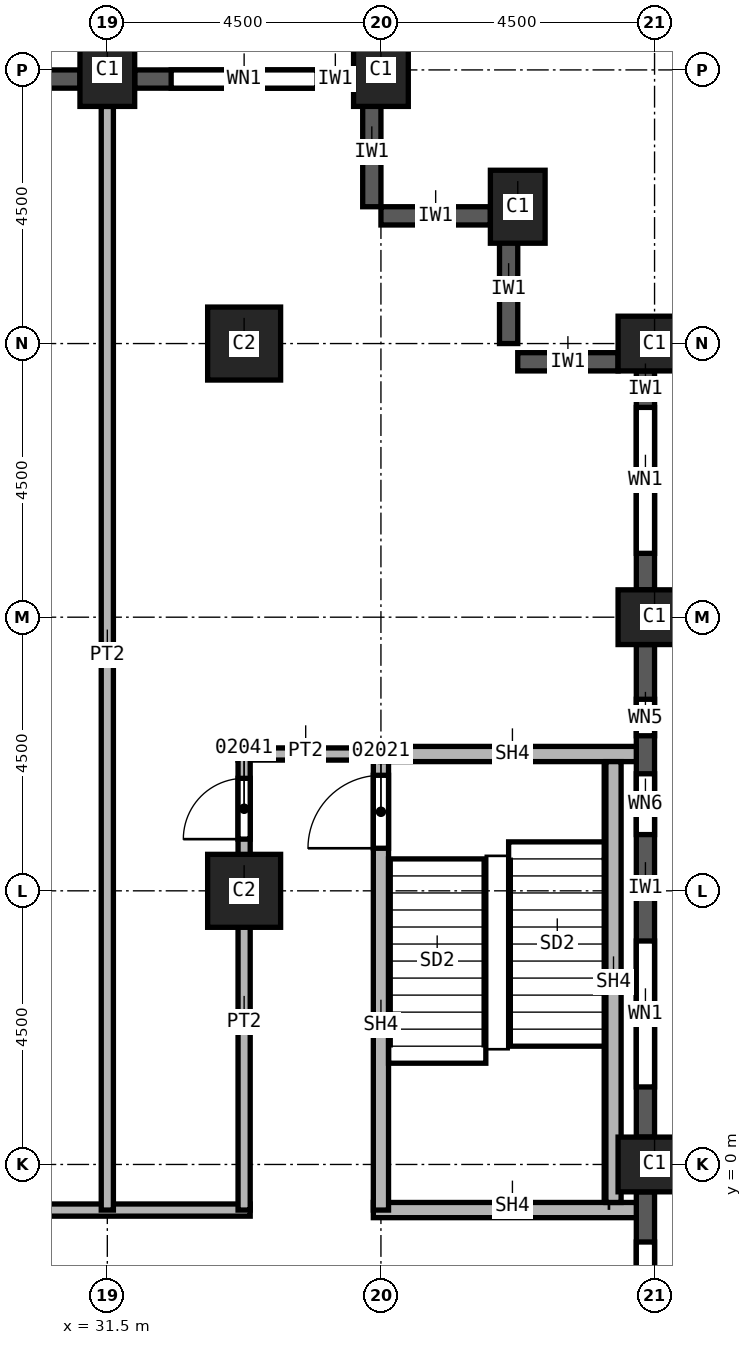
"""IFC4 building model, lengths in metres.
Left out: names, types, materials, properties, quantities, classifications, styles, units other than length and angle.
Written with IfcOpenShell. Run it as: python <this file> out.ifc"""

import sys

from ifc_helpers import new_model, si_unit, direction, frame, frame_2d, origin, origin_2d, place, context, subcontext, project, spatial, rectangle, extrude, element, fill, save


model = new_model("IFC4")
c1 = context("Model", 3, precision=1e-05, world=origin(), true_north=direction((0.0, 1.0)))
c2 = subcontext(c1, "Body", "Model", "MODEL_VIEW")
j1 = project(units=[si_unit("LENGTHUNIT", "METRE"), si_unit("PLANEANGLEUNIT", "RADIAN")], contexts=[c1])
p1 = place(None, origin())
s1 = spatial("IfcSite", under=j1, at=p1, CompositionType="ELEMENT")
p2 = place(p1, origin())
s2 = spatial("IfcBuilding", under=s1, at=p2, CompositionType="ELEMENT")
p3 = place(p2, frame((0.0, 0.0, 80.0)))
s3 = spatial("IfcBuildingStorey", under=s2, at=p3, CompositionType="ELEMENT", Elevation=80.0)
for number, where, z_axis, x_axis in (
    (1, (40.5, 0.0, 0.0), (0.0, 0.0, 1.0), (0.0, 1.0, 0.0)),
    (2, (40.5, 9.0, 0.0), (0.0, 0.0, 1.0), (0.0, 1.0, 0.0)),
    (3, (40.5, 13.5, 0.0), (0.0, 0.0, 1.0), (0.0, 1.0, 0.0)),
    (4, (38.25, 15.75, 0.0), (0.0, 0.0, 1.0), (1.0, 0.0, 0.0)),
    (5, (31.5, 18.0, 0.0), (0.0, 0.0, 1.0), (1.0, 0.0, 0.0)),
    (6, (36.0, 18.0, 0.0), (0.0, 0.0, 1.0), (1.0, 0.0, 0.0)),
):
    element("IfcColumn", number, at=place(p3, frame(where, z_axis=z_axis, x_axis=x_axis)), inside=s3, PredefinedType="COLUMN", context=c2, shape_type="SweptSolid", body=[
        extrude(rectangle(XDim=0.9, YDim=1.2, at=origin_2d()), origin(), (0.0, 0.0, 1.0), 3.7),
    ])
for number, where, z_axis, x_axis in (
    (7, (33.75, 4.5, 0.0), (0.0, 0.0, 1.0), (1.0, 0.0, 0.0)),
    (8, (33.75, 13.5, 0.0), (0.0, 0.0, 1.0), (1.0, 0.0, 0.0)),
):
    element("IfcColumn", number, at=place(p3, frame(where, z_axis=z_axis, x_axis=x_axis)), inside=s3, PredefinedType="COLUMN", context=c2, shape_type="SweptSolid", body=[
        extrude(rectangle(XDim=1.2, YDim=1.2, at=origin_2d()), origin(), (0.0, 0.0, 1.0), 3.7),
    ])
p4 = place(p3, frame((39.9, 13.2, 0.0), z_axis=(0.0, 0.0, 1.0), x_axis=(-1.0, 0.0, 0.0)))
e9 = element("IfcWall", 9, at=p4, inside=s3, PredefinedType="SOLIDWALL", context=c2, shape_type="SweptSolid", body=[
    extrude(rectangle(XDim=1.65, YDim=0.3, at=frame_2d((0.825, 0.0))), origin(), (0.0, 0.0, 1.0), 3.1),
])
for number, where, z_axis, x_axis in (
    (10, (38.1, 15.3, 0.0), (0.0, 0.0, 1.0), (0.0, -1.0, 0.0)),
    (11, (37.8, 15.6, 0.0), (0.0, 0.0, 1.0), (-1.0, 0.0, 0.0)),
    (12, (35.85, 17.55, 0.0), (0.0, 0.0, 1.0), (0.0, -1.0, 0.0)),
):
    element("IfcWall", number, at=place(p3, frame(where, z_axis=z_axis, x_axis=x_axis)), inside=s3, PredefinedType="SOLIDWALL", context=c2, shape_type="SweptSolid", body=[
        extrude(rectangle(XDim=1.8, YDim=0.3, at=frame_2d((0.9, 0.0))), origin(), (0.0, 0.0, 1.0), 3.1),
    ])
p5 = place(p3, frame((40.35, -8.55, 0.0), z_axis=(0.0, 0.0, 1.0), x_axis=(0.0, 1.0, 0.0)))
e13 = element("IfcWall", 13, at=p5, inside=s3, PredefinedType="SOLIDWALL", context=c2, shape_type="SweptSolid", body=[
    extrude(rectangle(XDim=8.1, YDim=0.3, at=frame_2d((4.05, 0.0))), origin(), (0.0, 0.0, 1.0), 3.1),
])
p6 = place(p5, frame((0.825, 0.0, 0.8)))
e14 = element("IfcOpeningElement", 14, at=p6, cuts=e13, PredefinedType="OPENING", context=c2, shape_type="SweptSolid", body=[
    extrude(rectangle(XDim=2.4, YDim=1.95, at=frame_2d((1.2, 0.975))), frame((0.0, 0.15, 0.0), z_axis=(0.0, -1.0, 0.0), x_axis=(1.0, 0.0, 0.0)), (0.0, 0.0, 1.0), 0.3),
])
p7 = place(p5, frame((4.875, 0.0, 0.8)))
e15 = element("IfcOpeningElement", 15, at=p7, cuts=e13, PredefinedType="OPENING", context=c2, shape_type="SweptSolid", body=[
    extrude(rectangle(XDim=2.4, YDim=1.95, at=frame_2d((1.2, 0.975))), frame((0.0, 0.15, 0.0), z_axis=(0.0, -1.0, 0.0), x_axis=(1.0, 0.0, 0.0)), (0.0, 0.0, 1.0), 0.3),
])
p8 = place(p3, frame((40.35, 0.45, 0.0), z_axis=(0.0, 0.0, 1.0), x_axis=(0.0, 1.0, 0.0)))
e16 = element("IfcWall", 16, at=p8, inside=s3, PredefinedType="SOLIDWALL", context=c2, shape_type="SweptSolid", body=[
    extrude(rectangle(XDim=8.1, YDim=0.3, at=frame_2d((4.05, 0.0))), origin(), (0.0, 0.0, 1.0), 3.1),
])
p9 = place(p8, frame((0.825, 0.0, 0.8)))
e17 = element("IfcOpeningElement", 17, at=p9, cuts=e16, PredefinedType="OPENING", context=c2, shape_type="SweptSolid", body=[
    extrude(rectangle(XDim=2.4, YDim=1.95, at=frame_2d((1.2, 0.975))), frame((0.0, 0.15, 0.0), z_axis=(0.0, -1.0, 0.0), x_axis=(1.0, 0.0, 0.0)), (0.0, 0.0, 1.0), 0.3),
])
p10 = place(p8, frame((4.975, 0.0, 0.8)))
e18 = element("IfcOpeningElement", 18, at=p10, cuts=e16, PredefinedType="OPENING", context=c2, shape_type="SweptSolid", body=[
    extrude(rectangle(XDim=1.0, YDim=1.95, at=frame_2d((0.5, 0.975))), frame((0.0, 0.15, 0.0), z_axis=(0.0, -1.0, 0.0), x_axis=(1.0, 0.0, 0.0)), (0.0, 0.0, 1.0), 0.3),
])
p11 = place(p8, frame((6.6, 0.0, 0.8)))
e19 = element("IfcOpeningElement", 19, at=p11, cuts=e16, PredefinedType="OPENING", context=c2, shape_type="SweptSolid", body=[
    extrude(rectangle(XDim=0.6, YDim=1.95, at=frame_2d((0.3, 0.975))), frame((0.0, 0.15, 0.0), z_axis=(0.0, -1.0, 0.0), x_axis=(1.0, 0.0, 0.0)), (0.0, 0.0, 1.0), 0.3),
])
p12 = place(p3, frame((40.35, 9.45, 0.0), z_axis=(0.0, 0.0, 1.0), x_axis=(0.0, 1.0, 0.0)))
e20 = element("IfcWall", 20, at=p12, inside=s3, PredefinedType="SOLIDWALL", context=c2, shape_type="SweptSolid", body=[
    extrude(rectangle(XDim=3.6, YDim=0.3, at=frame_2d((1.8, 0.0))), origin(), (0.0, 0.0, 1.0), 3.1),
])
p13 = place(p12, frame((0.6, 0.0, 0.8)))
e21 = element("IfcOpeningElement", 21, at=p13, cuts=e20, PredefinedType="OPENING", context=c2, shape_type="SweptSolid", body=[
    extrude(rectangle(XDim=2.4, YDim=1.95, at=frame_2d((1.2, 0.975))), frame((0.0, 0.15, 0.0), z_axis=(0.0, -1.0, 0.0), x_axis=(1.0, 0.0, 0.0)), (0.0, 0.0, 1.0), 0.3),
])
p14 = place(p3, frame((35.55, 17.85, 0.0), z_axis=(0.0, 0.0, 1.0), x_axis=(-1.0, 0.0, 0.0)))
e22 = element("IfcWall", 22, at=p14, inside=s3, PredefinedType="SOLIDWALL", context=c2, shape_type="SweptSolid", body=[
    extrude(rectangle(XDim=3.6, YDim=0.3, at=frame_2d((1.8, 0.0))), origin(), (0.0, 0.0, 1.0), 3.1),
])
p15 = place(p14, frame((0.6, 0.0, 0.8)))
e23 = element("IfcOpeningElement", 23, at=p15, cuts=e22, PredefinedType="OPENING", context=c2, shape_type="SweptSolid", body=[
    extrude(rectangle(XDim=2.4, YDim=1.95, at=frame_2d((1.2, 0.975))), frame((0.0, 0.15, 0.0), z_axis=(0.0, -1.0, 0.0), x_axis=(1.0, 0.0, 0.0)), (0.0, 0.0, 1.0), 0.3),
])
p16 = place(p3, frame((31.05, 17.85, 0.0), z_axis=(0.0, 0.0, 1.0), x_axis=(-1.0, 0.0, 0.0)))
e24 = element("IfcWall", 24, at=p16, inside=s3, PredefinedType="SOLIDWALL", context=c2, shape_type="SweptSolid", body=[
    extrude(rectangle(XDim=3.6, YDim=0.3, at=frame_2d((1.8, 0.0))), origin(), (0.0, 0.0, 1.0), 3.1),
])
p17 = place(p16, frame((0.6, 0.0, 0.8)))
e25 = element("IfcOpeningElement", 25, at=p17, cuts=e24, PredefinedType="OPENING", context=c2, shape_type="SweptSolid", body=[
    extrude(rectangle(XDim=2.4, YDim=1.95, at=frame_2d((1.2, 0.975))), frame((0.0, 0.15, 0.0), z_axis=(0.0, -1.0, 0.0), x_axis=(1.0, 0.0, 0.0)), (0.0, 0.0, 1.0), 0.3),
])
p18 = place(p3, frame((15.4, -0.75, 0.0), z_axis=(0.0, 0.0, 1.0), x_axis=(1.0, 0.0, 0.0)))
e26 = element("IfcWall", 26, at=p18, inside=s3, PredefinedType="PARTITIONING", context=c2, shape_type="SweptSolid", body=[
    extrude(rectangle(XDim=18.45, YDim=0.2, at=frame_2d((9.225, 0.0))), origin(), (0.0, 0.0, 1.0), 3.7),
])
p19 = place(p18, frame((3.55, 0.0, 0.0)))
e27 = element("IfcOpeningElement", 27, at=p19, cuts=e26, PredefinedType="OPENING", context=c2, shape_type="SweptSolid", body=[
    extrude(rectangle(XDim=1.0, YDim=2.1, at=frame_2d((0.5, 1.05))), frame((0.0, 0.1, 0.0), z_axis=(0.0, -1.0, 0.0), x_axis=(1.0, 0.0, 0.0)), (0.0, 0.0, 1.0), 0.2),
])
p20 = place(p18, frame((12.35, 0.0, 0.0)))
e28 = element("IfcOpeningElement", 28, at=p20, cuts=e26, PredefinedType="OPENING", context=c2, shape_type="SweptSolid", body=[
    extrude(rectangle(XDim=1.0, YDim=2.1, at=frame_2d((0.5, 1.05))), frame((0.0, 0.1, 0.0), z_axis=(0.0, -1.0, 0.0), x_axis=(1.0, 0.0, 0.0)), (0.0, 0.0, 1.0), 0.2),
])
p21 = place(p3, frame((31.5, 17.4, 0.0), z_axis=(0.0, 0.0, 1.0), x_axis=(0.0, -1.0, 0.0)))
e29 = element("IfcWall", 29, at=p21, inside=s3, PredefinedType="PARTITIONING", context=c2, shape_type="SweptSolid", body=[
    extrude(rectangle(XDim=18.15, YDim=0.2, at=frame_2d((9.075, 0.0))), origin(), (0.0, 0.0, 1.0), 3.7),
])
p22 = place(p3, frame((33.65, 6.75, 0.0), z_axis=(0.0, 0.0, 1.0), x_axis=(1.0, 0.0, 0.0)))
e30 = element("IfcWall", 30, at=p22, inside=s3, PredefinedType="PARTITIONING", context=c2, shape_type="SweptSolid", body=[
    extrude(rectangle(XDim=2.35, YDim=0.2, at=frame_2d((1.175, 0.0))), origin(), (0.0, 0.0, 1.0), 3.7),
])
p23 = place(p3, frame((33.75, -0.75, 0.0), z_axis=(0.0, 0.0, 1.0), x_axis=(0.0, 1.0, 0.0)))
e31 = element("IfcWall", 31, at=p23, inside=s3, PredefinedType="PARTITIONING", context=c2, shape_type="SweptSolid", body=[
    extrude(rectangle(XDim=7.5, YDim=0.2, at=frame_2d((3.75, 0.0))), origin(), (0.0, 0.0, 1.0), 3.7),
])
p24 = place(p23, frame((6.1, 0.0, 0.0)))
e32 = element("IfcOpeningElement", 32, at=p24, cuts=e31, PredefinedType="OPENING", context=c2, shape_type="SweptSolid", body=[
    extrude(rectangle(XDim=1.0, YDim=2.1, at=frame_2d((0.5, 1.05))), frame((0.0, 0.1, 0.0), z_axis=(0.0, -1.0, 0.0), x_axis=(1.0, 0.0, 0.0)), (0.0, 0.0, 1.0), 0.2),
])
p25 = place(p3, frame((35.875, -0.75, 0.0), z_axis=(0.0, 0.0, 1.0), x_axis=(1.0, 0.0, 0.0)))
e33 = element("IfcWall", 33, at=p25, inside=s3, PredefinedType="SOLIDWALL", context=c2, shape_type="SweptSolid", body=[
    extrude(rectangle(XDim=4.325, YDim=0.25, at=frame_2d((2.163, 0.0))), origin(), (0.0, 0.0, 1.0), 3.7),
])
p26 = place(p3, frame((36.0, -0.75, 0.0), z_axis=(0.0, 0.0, 1.0), x_axis=(0.0, 1.0, 0.0)))
e34 = element("IfcWall", 34, at=p26, inside=s3, PredefinedType="SOLIDWALL", context=c2, shape_type="SweptSolid", body=[
    extrude(rectangle(XDim=7.625, YDim=0.25, at=frame_2d((3.812, 0.0))), origin(), (0.0, 0.0, 1.0), 3.7),
])
p27 = place(p26, frame((5.95, 0.0, 0.0)))
e35 = element("IfcOpeningElement", 35, at=p27, cuts=e34, PredefinedType="OPENING", context=c2, shape_type="SweptSolid", body=[
    extrude(rectangle(XDim=1.2, YDim=2.1, at=frame_2d((0.6, 1.05))), frame((0.0, 0.125, 0.0), z_axis=(0.0, -1.0, 0.0), x_axis=(1.0, 0.0, 0.0)), (0.0, 0.0, 1.0), 0.25),
])
p28 = place(p3, frame((36.0, 6.75, 0.0), z_axis=(0.0, 0.0, 1.0), x_axis=(1.0, 0.0, 0.0)))
e36 = element("IfcWall", 36, at=p28, inside=s3, PredefinedType="SOLIDWALL", context=c2, shape_type="SweptSolid", body=[
    extrude(rectangle(XDim=4.2, YDim=0.25, at=frame_2d((2.1, 0.0))), origin(), (0.0, 0.0, 1.0), 3.7),
])
p29 = place(p3, frame((39.825, -0.625, 0.0), z_axis=(0.0, 0.0, 1.0), x_axis=(0.0, 1.0, 0.0)))
e37 = element("IfcWall", 37, at=p29, inside=s3, PredefinedType="SOLIDWALL", context=c2, shape_type="SweptSolid", body=[
    extrude(rectangle(XDim=7.25, YDim=0.25, at=frame_2d((3.625, 0.0))), origin(), (0.0, 0.0, 1.0), 3.7),
])
p30 = place(p7, origin())
e38 = element("IfcWindow", 38, at=p30, inside=s3, PartitioningType="SINGLE_PANEL", PredefinedType="WINDOW", context=c2, shape_type="SweptSolid", body=[
    extrude(rectangle(XDim=2.4, YDim=1.95, at=frame_2d((1.2, 0.975))), frame((0.0, 0.03, 0.0), z_axis=(0.0, -1.0, 0.0), x_axis=(1.0, 0.0, 0.0)), (0.0, 0.0, 1.0), 0.06),
])
fill(e15, e38)
p31 = place(p9, origin())
e39 = element("IfcWindow", 39, at=p31, inside=s3, PartitioningType="SINGLE_PANEL", PredefinedType="WINDOW", context=c2, shape_type="SweptSolid", body=[
    extrude(rectangle(XDim=2.4, YDim=1.95, at=frame_2d((1.2, 0.975))), frame((0.0, 0.03, 0.0), z_axis=(0.0, -1.0, 0.0), x_axis=(1.0, 0.0, 0.0)), (0.0, 0.0, 1.0), 0.06),
])
fill(e17, e39)
p32 = place(p13, origin())
e40 = element("IfcWindow", 40, at=p32, inside=s3, PartitioningType="SINGLE_PANEL", PredefinedType="WINDOW", context=c2, shape_type="SweptSolid", body=[
    extrude(rectangle(XDim=2.4, YDim=1.95, at=frame_2d((1.2, 0.975))), frame((0.0, 0.03, 0.0), z_axis=(0.0, -1.0, 0.0), x_axis=(1.0, 0.0, 0.0)), (0.0, 0.0, 1.0), 0.06),
])
fill(e21, e40)
p33 = place(p15, origin())
e41 = element("IfcWindow", 41, at=p33, inside=s3, PartitioningType="SINGLE_PANEL", PredefinedType="WINDOW", context=c2, shape_type="SweptSolid", body=[
    extrude(rectangle(XDim=2.4, YDim=1.95, at=frame_2d((1.2, 0.975))), frame((0.0, 0.03, 0.0), z_axis=(0.0, -1.0, 0.0), x_axis=(1.0, 0.0, 0.0)), (0.0, 0.0, 1.0), 0.06),
])
fill(e23, e41)
p34 = place(p27, origin())
e42 = element("IfcDoor", 42, at=p34, inside=s3, OperationType="SINGLE_SWING_RIGHT", PredefinedType="DOOR", context=c2, shape_type="SweptSolid", body=[
    extrude(rectangle(XDim=1.2, YDim=2.1, at=frame_2d((0.6, 1.05))), frame((0.0, 0.025, 0.0), z_axis=(0.0, -1.0, 0.0), x_axis=(1.0, 0.0, 0.0)), (0.0, 0.0, 1.0), 0.05),
])
fill(e35, e42)
p35 = place(p24, origin())
e43 = element("IfcDoor", 43, at=p35, inside=s3, OperationType="SINGLE_SWING_RIGHT", PredefinedType="DOOR", context=c2, shape_type="SweptSolid", body=[
    extrude(rectangle(XDim=1.0, YDim=2.1, at=frame_2d((0.5, 1.05))), frame((0.0, 0.025, 0.0), z_axis=(0.0, -1.0, 0.0), x_axis=(1.0, 0.0, 0.0)), (0.0, 0.0, 1.0), 0.05),
])
fill(e32, e43)
p36 = place(p10, origin())
e44 = element("IfcWindow", 44, at=p36, inside=s3, PartitioningType="SINGLE_PANEL", PredefinedType="WINDOW", context=c2, shape_type="SweptSolid", body=[
    extrude(rectangle(XDim=1.0, YDim=1.95, at=frame_2d((0.5, 0.975))), frame((0.0, 0.03, 0.0), z_axis=(0.0, -1.0, 0.0), x_axis=(1.0, 0.0, 0.0)), (0.0, 0.0, 1.0), 0.06),
])
fill(e18, e44)
p37 = place(p11, origin())
e45 = element("IfcWindow", 45, at=p37, inside=s3, PartitioningType="SINGLE_PANEL", PredefinedType="WINDOW", context=c2, shape_type="SweptSolid", body=[
    extrude(rectangle(XDim=0.6, YDim=1.95, at=frame_2d((0.3, 0.975))), frame((0.0, 0.03, 0.0), z_axis=(0.0, -1.0, 0.0), x_axis=(1.0, 0.0, 0.0)), (0.0, 0.0, 1.0), 0.06),
])
fill(e19, e45)
save(model, sys.argv[1])
